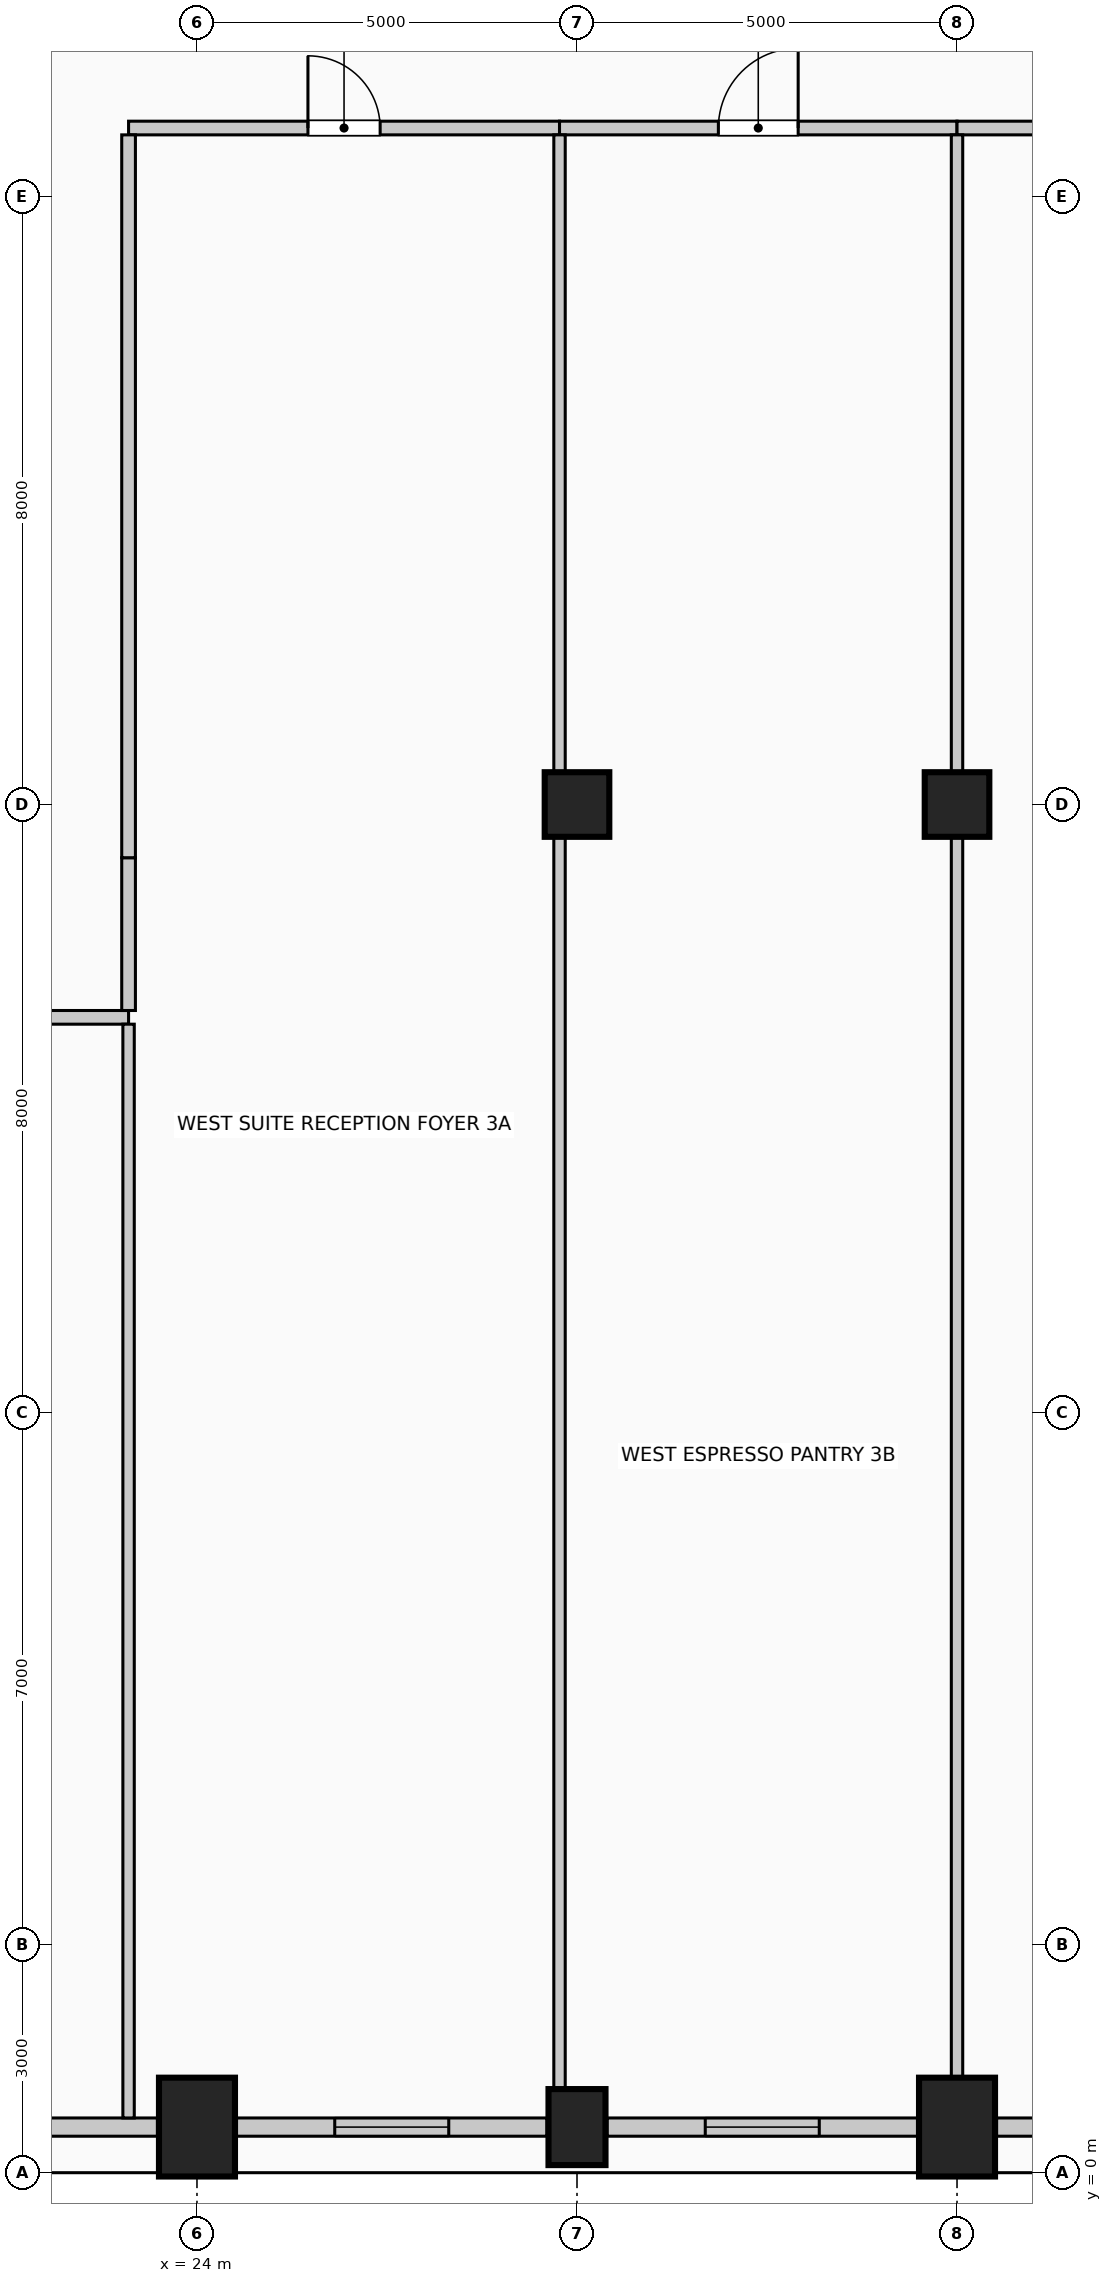
"""IFC4 building model, lengths in metres.
Left out: names, types, materials, properties, quantities, classifications, styles, units other than length and angle.
Written with IfcOpenShell. Run it as: python <this file> out.ifc"""

import sys

from ifc_helpers import new_model, si_unit, direction, frame, frame_2d, origin, origin_2d, place, context, subcontext, project, spatial, rectangle, circle, extrude, element, fill, save


model = new_model("IFC4")
c1 = context("Model", 3, precision=1e-05, world=origin(), true_north=direction((0.0, 1.0)))
c2 = subcontext(c1, "Body", "Model", "MODEL_VIEW")
j1 = project(units=[si_unit("LENGTHUNIT", "METRE"), si_unit("PLANEANGLEUNIT", "RADIAN")], contexts=[c1])
p1 = place(None, origin())
s1 = spatial("IfcSite", under=j1, at=p1, CompositionType="ELEMENT")
p2 = place(p1, origin())
s2 = spatial("IfcBuilding", under=s1, at=p2, CompositionType="ELEMENT")
p3 = place(p2, frame((0.0, 0.0, 234.6)))
s3 = spatial("IfcBuildingStorey", under=s2, at=p3, CompositionType="ELEMENT", Elevation=234.6)
p4 = place(p3, frame((24.0, 0.6, 0.0), z_axis=(0.0, 0.0, 1.0), x_axis=(1.0, 0.0, 0.0)))
e1 = element("IfcColumn", 1, at=p4, inside=s3, PredefinedType="COLUMN", context=c2, shape_type="SweptSolid", body=[
    extrude(rectangle(XDim=1.0, YDim=1.3, at=origin_2d()), origin(), (0.0, 0.0, 1.0), 4.0),
])
p5 = place(p3, frame((29.0, 0.6, 0.0), z_axis=(0.0, 0.0, 1.0), x_axis=(1.0, 0.0, 0.0)))
e2 = element("IfcColumn", 2, at=p5, inside=s3, PredefinedType="COLUMN", context=c2, shape_type="SweptSolid", body=[
    extrude(rectangle(XDim=0.75, YDim=1.0, at=origin_2d()), origin(), (0.0, 0.0, 1.0), 4.0),
])
p6 = place(p3, frame((34.0, 0.6, 0.0), z_axis=(0.0, 0.0, 1.0), x_axis=(1.0, 0.0, 0.0)))
e3 = element("IfcColumn", 3, at=p6, inside=s3, PredefinedType="COLUMN", context=c2, shape_type="SweptSolid", body=[
    extrude(rectangle(XDim=1.0, YDim=1.3, at=origin_2d()), origin(), (0.0, 0.0, 1.0), 4.0),
])
for number, where, z_axis, x_axis in (
    (4, (29.0, 18.0, 0.0), (0.0, 0.0, 1.0), (1.0, 0.0, 0.0)),
    (5, (34.0, 18.0, 0.0), (0.0, 0.0, 1.0), (1.0, 0.0, 0.0)),
):
    element("IfcColumn", number, at=place(p3, frame(where, z_axis=z_axis, x_axis=x_axis)), inside=s3, PredefinedType="COLUMN", context=c2, shape_type="SweptSolid", body=[
        extrude(circle(Radius=0.425, at=origin_2d()), origin(), (0.0, 0.0, 1.0), 4.0),
    ])
p7 = place(p3, frame((23.48, 0.6, 0.0), z_axis=(0.0, 0.0, 1.0), x_axis=(-1.0, 0.0, 0.0)))
e6 = element("IfcWall", 6, at=p7, inside=s3, PredefinedType="SOLIDWALL", context=c2, shape_type="SweptSolid", body=[
    extrude(rectangle(XDim=6.56, YDim=0.24, at=frame_2d((3.28, 0.0))), origin(), (0.0, 0.0, 1.0), 2.91),
])
p8 = place(p7, frame((3.873, 0.0, 0.42)))
e7 = element("IfcOpeningElement", 7, at=p8, cuts=e6, PredefinedType="OPENING", context=c2, shape_type="SweptSolid", body=[
    extrude(rectangle(XDim=1.5, YDim=2.2, at=frame_2d((0.75, 1.1))), frame((0.0, 0.13, 0.0), z_axis=(0.0, -1.0, 0.0), x_axis=(1.0, 0.0, 0.0)), (0.0, 0.0, 1.0), 0.26),
])
p9 = place(p3, frame((28.605, 0.6, 0.0), z_axis=(0.0, 0.0, 1.0), x_axis=(-1.0, 0.0, 0.0)))
e8 = element("IfcWall", 8, at=p9, inside=s3, PredefinedType="SOLIDWALL", context=c2, shape_type="SweptSolid", body=[
    extrude(rectangle(XDim=4.085, YDim=0.24, at=frame_2d((2.042, 0.0))), origin(), (0.0, 0.0, 1.0), 2.91),
])
p10 = place(p9, frame((1.292, 0.0, 0.42)))
e9 = element("IfcOpeningElement", 9, at=p10, cuts=e8, PredefinedType="OPENING", context=c2, shape_type="SweptSolid", body=[
    extrude(rectangle(XDim=1.5, YDim=2.2, at=frame_2d((0.75, 1.1))), frame((0.0, 0.13, 0.0), z_axis=(0.0, -1.0, 0.0), x_axis=(1.0, 0.0, 0.0)), (0.0, 0.0, 1.0), 0.26),
])
p11 = place(p3, frame((33.48, 0.6, 0.0), z_axis=(0.0, 0.0, 1.0), x_axis=(-1.0, 0.0, 0.0)))
e10 = element("IfcWall", 10, at=p11, inside=s3, PredefinedType="SOLIDWALL", context=c2, shape_type="SweptSolid", body=[
    extrude(rectangle(XDim=4.085, YDim=0.24, at=frame_2d((2.042, 0.0))), origin(), (0.0, 0.0, 1.0), 2.91),
])
p12 = place(p11, frame((1.292, 0.0, 0.42)))
e11 = element("IfcOpeningElement", 11, at=p12, cuts=e10, PredefinedType="OPENING", context=c2, shape_type="SweptSolid", body=[
    extrude(rectangle(XDim=1.5, YDim=2.2, at=frame_2d((0.75, 1.1))), frame((0.0, 0.13, 0.0), z_axis=(0.0, -1.0, 0.0), x_axis=(1.0, 0.0, 0.0)), (0.0, 0.0, 1.0), 0.26),
])
p13 = place(p3, frame((41.08, 0.6, 0.0), z_axis=(0.0, 0.0, 1.0), x_axis=(-1.0, 0.0, 0.0)))
e12 = element("IfcWall", 12, at=p13, inside=s3, PredefinedType="SOLIDWALL", context=c2, shape_type="SweptSolid", body=[
    extrude(rectangle(XDim=6.56, YDim=0.24, at=frame_2d((3.28, 0.0))), origin(), (0.0, 0.0, 1.0), 2.91),
])
p14 = place(p13, frame((1.187, 0.0, 0.42)))
e13 = element("IfcOpeningElement", 13, at=p14, cuts=e12, PredefinedType="OPENING", context=c2, shape_type="SweptSolid", body=[
    extrude(rectangle(XDim=1.5, YDim=2.2, at=frame_2d((0.75, 1.1))), frame((0.0, 0.13, 0.0), z_axis=(0.0, -1.0, 0.0), x_axis=(1.0, 0.0, 0.0)), (0.0, 0.0, 1.0), 0.26),
])
p15 = place(p13, frame((3.873, 0.0, 0.42)))
e14 = element("IfcOpeningElement", 14, at=p15, cuts=e12, PredefinedType="OPENING", context=c2, shape_type="SweptSolid", body=[
    extrude(rectangle(XDim=1.5, YDim=2.2, at=frame_2d((0.75, 1.1))), frame((0.0, 0.13, 0.0), z_axis=(0.0, -1.0, 0.0), x_axis=(1.0, 0.0, 0.0)), (0.0, 0.0, 1.0), 0.26),
])
p16 = place(p3, frame((16.4, 15.2, 0.0), z_axis=(0.0, 0.0, 1.0), x_axis=(1.0, 0.0, 0.0)))
e15 = element("IfcWall", 15, at=p16, inside=s3, PredefinedType="PARTITIONING", context=c2, shape_type="SweptSolid", body=[
    extrude(rectangle(XDim=6.7, YDim=0.18, at=frame_2d((3.35, 0.0))), origin(), (0.0, 0.0, 1.0), 3.66),
])
p17 = place(p16, frame((2.825, 0.0, 0.0)))
e16 = element("IfcOpeningElement", 16, at=p17, cuts=e15, PredefinedType="OPENING", context=c2, shape_type="SweptSolid", body=[
    extrude(rectangle(XDim=1.05, YDim=2.15, at=frame_2d((0.525, 1.075))), frame((0.0, 0.1, 0.0), z_axis=(0.0, -1.0, 0.0), x_axis=(1.0, 0.0, 0.0)), (0.0, 0.0, 1.0), 0.2),
])
p18 = place(p3, frame((23.1, 26.9, 0.0), z_axis=(0.0, 0.0, 1.0), x_axis=(1.0, 0.0, 0.0)))
e17 = element("IfcWall", 17, at=p18, inside=s3, PredefinedType="PARTITIONING", context=c2, shape_type="SweptSolid", body=[
    extrude(rectangle(XDim=5.67, YDim=0.18, at=frame_2d((2.835, 0.0))), origin(), (0.0, 0.0, 1.0), 3.66),
])
p19 = place(p18, frame((2.36, 0.0, 0.0)))
e18 = element("IfcOpeningElement", 18, at=p19, cuts=e17, PredefinedType="OPENING", context=c2, shape_type="SweptSolid", body=[
    extrude(rectangle(XDim=0.95, YDim=2.15, at=frame_2d((0.475, 1.075))), frame((0.0, 0.1, 0.0), z_axis=(0.0, -1.0, 0.0), x_axis=(1.0, 0.0, 0.0)), (0.0, 0.0, 1.0), 0.2),
])
p20 = place(p3, frame((28.77, 26.9, 0.0), z_axis=(0.0, 0.0, 1.0), x_axis=(1.0, 0.0, 0.0)))
e19 = element("IfcWall", 19, at=p20, inside=s3, PredefinedType="PARTITIONING", context=c2, shape_type="SweptSolid", body=[
    extrude(rectangle(XDim=5.23, YDim=0.18, at=frame_2d((2.615, 0.0))), origin(), (0.0, 0.0, 1.0), 3.66),
])
p21 = place(p20, frame((2.09, 0.0, 0.0)))
e20 = element("IfcOpeningElement", 20, at=p21, cuts=e19, PredefinedType="OPENING", context=c2, shape_type="SweptSolid", body=[
    extrude(rectangle(XDim=1.05, YDim=2.15, at=frame_2d((0.525, 1.075))), frame((0.0, 0.1, 0.0), z_axis=(0.0, -1.0, 0.0), x_axis=(1.0, 0.0, 0.0)), (0.0, 0.0, 1.0), 0.2),
])
p22 = place(p3, frame((34.0, 26.9, 0.0), z_axis=(0.0, 0.0, 1.0), x_axis=(1.0, 0.0, 0.0)))
e21 = element("IfcWall", 21, at=p22, inside=s3, PredefinedType="PARTITIONING", context=c2, shape_type="SweptSolid", body=[
    extrude(rectangle(XDim=23.28, YDim=0.18, at=frame_2d((11.64, 0.0))), origin(), (0.0, 0.0, 1.0), 3.66),
])
p23 = place(p22, frame((11.165, 0.0, 0.0)))
e22 = element("IfcOpeningElement", 22, at=p23, cuts=e21, PredefinedType="OPENING", context=c2, shape_type="SweptSolid", body=[
    extrude(rectangle(XDim=0.95, YDim=2.15, at=frame_2d((0.475, 1.075))), frame((0.0, 0.1, 0.0), z_axis=(0.0, -1.0, 0.0), x_axis=(1.0, 0.0, 0.0)), (0.0, 0.0, 1.0), 0.2),
])
p24 = place(p3, frame((23.1, 0.72, 0.0), z_axis=(0.0, 0.0, 1.0), x_axis=(0.0, 1.0, 0.0)))
e23 = element("IfcWall", 23, at=p24, inside=s3, PredefinedType="PARTITIONING", context=c2, shape_type="SweptSolid", body=[
    extrude(rectangle(XDim=14.39, YDim=0.15, at=frame_2d((7.195, 0.0))), origin(), (0.0, 0.0, 1.0), 3.66),
])
p25 = place(p3, frame((23.1, 15.29, 0.0), z_axis=(0.0, 0.0, 1.0), x_axis=(0.0, 1.0, 0.0)))
e24 = element("IfcWall", 24, at=p25, inside=s3, PredefinedType="PARTITIONING", context=c2, shape_type="SweptSolid", body=[
    extrude(rectangle(XDim=2.01, YDim=0.18, at=frame_2d((1.005, 0.0))), origin(), (0.0, 0.0, 1.0), 3.66),
])
p26 = place(p3, frame((23.1, 17.3, 0.0), z_axis=(0.0, 0.0, 1.0), x_axis=(0.0, 1.0, 0.0)))
e25 = element("IfcWall", 25, at=p26, inside=s3, PredefinedType="PARTITIONING", context=c2, shape_type="SweptSolid", body=[
    extrude(rectangle(XDim=9.51, YDim=0.18, at=frame_2d((4.755, 0.0))), origin(), (0.0, 0.0, 1.0), 3.66),
])
p27 = place(p3, frame((28.77, 1.1, 0.0), z_axis=(0.0, 0.0, 1.0), x_axis=(0.0, 1.0, 0.0)))
e26 = element("IfcWall", 26, at=p27, inside=s3, PredefinedType="PARTITIONING", context=c2, shape_type="SweptSolid", body=[
    extrude(rectangle(XDim=16.475, YDim=0.15, at=frame_2d((8.237, 0.0))), origin(), (0.0, 0.0, 1.0), 3.055),
])
p28 = place(p3, frame((28.77, 18.425, 0.0), z_axis=(0.0, 0.0, 1.0), x_axis=(0.0, 1.0, 0.0)))
e27 = element("IfcWall", 27, at=p28, inside=s3, PredefinedType="PARTITIONING", context=c2, shape_type="SweptSolid", body=[
    extrude(rectangle(XDim=8.385, YDim=0.15, at=frame_2d((4.192, 0.0))), origin(), (0.0, 0.0, 1.0), 3.055),
])
p29 = place(p3, frame((34.0, 1.25, 0.0), z_axis=(0.0, 0.0, 1.0), x_axis=(0.0, 1.0, 0.0)))
e28 = element("IfcWall", 28, at=p29, inside=s3, PredefinedType="PARTITIONING", context=c2, shape_type="SweptSolid", body=[
    extrude(rectangle(XDim=16.325, YDim=0.15, at=frame_2d((8.163, 0.0))), origin(), (0.0, 0.0, 1.0), 3.055),
])
p30 = place(p3, frame((34.0, 18.425, 0.0), z_axis=(0.0, 0.0, 1.0), x_axis=(0.0, 1.0, 0.0)))
e29 = element("IfcWall", 29, at=p30, inside=s3, PredefinedType="PARTITIONING", context=c2, shape_type="SweptSolid", body=[
    extrude(rectangle(XDim=8.385, YDim=0.15, at=frame_2d((4.192, 0.0))), origin(), (0.0, 0.0, 1.0), 3.055),
])
p31 = place(p10, origin())
e30 = element("IfcWindow", 30, at=p31, inside=s3, PartitioningType="SINGLE_PANEL", PredefinedType="WINDOW", context=c2, shape_type="SweptSolid", body=[
    extrude(rectangle(XDim=1.5, YDim=2.2, at=frame_2d((0.75, 1.1))), frame((0.0, 0.03, 0.0), z_axis=(0.0, -1.0, 0.0), x_axis=(1.0, 0.0, 0.0)), (0.0, 0.0, 1.0), 0.06),
])
fill(e9, e30)
p32 = place(p12, origin())
e31 = element("IfcWindow", 31, at=p32, inside=s3, PartitioningType="SINGLE_PANEL", PredefinedType="WINDOW", context=c2, shape_type="SweptSolid", body=[
    extrude(rectangle(XDim=1.5, YDim=2.2, at=frame_2d((0.75, 1.1))), frame((0.0, 0.03, 0.0), z_axis=(0.0, -1.0, 0.0), x_axis=(1.0, 0.0, 0.0)), (0.0, 0.0, 1.0), 0.06),
])
fill(e11, e31)
p33 = place(p19, origin())
e32 = element("IfcDoor", 32, at=p33, inside=s3, OperationType="SINGLE_SWING_LEFT", PredefinedType="DOOR", context=c2, shape_type="SweptSolid", body=[
    extrude(rectangle(XDim=0.95, YDim=2.15, at=frame_2d((0.475, 1.075))), frame((0.0, 0.025, 0.0), z_axis=(0.0, -1.0, 0.0), x_axis=(1.0, 0.0, 0.0)), (0.0, 0.0, 1.0), 0.05),
])
fill(e18, e32)
p34 = place(p21, origin())
e33 = element("IfcDoor", 33, at=p34, inside=s3, OperationType="SINGLE_SWING_RIGHT", PredefinedType="DOOR", context=c2, shape_type="SweptSolid", body=[
    extrude(rectangle(XDim=1.05, YDim=2.15, at=frame_2d((0.525, 1.075))), frame((0.0, 0.025, 0.0), z_axis=(0.0, -1.0, 0.0), x_axis=(1.0, 0.0, 0.0)), (0.0, 0.0, 1.0), 0.05),
])
fill(e20, e33)
save(model, sys.argv[1])
